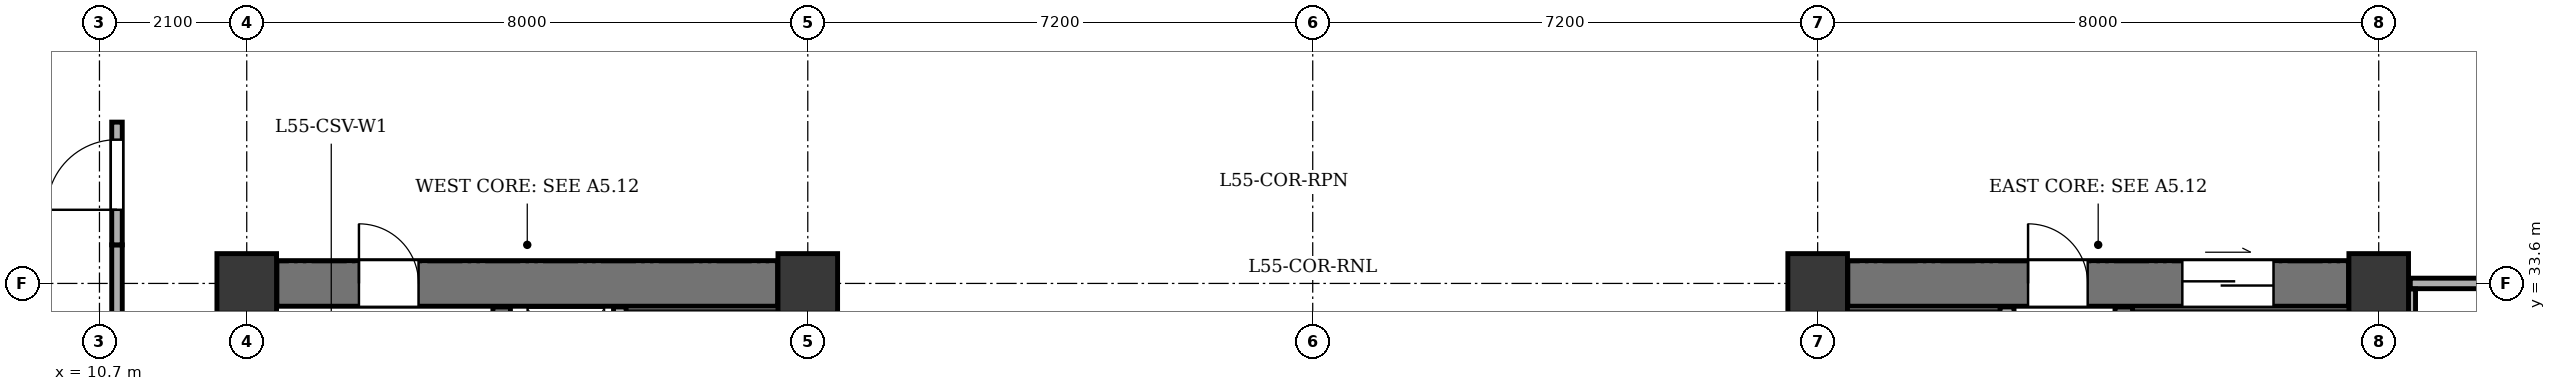
"""IFC4 building model, lengths in metres.
Left out: names, types, materials, properties, quantities, classifications, styles, units other than length and angle.
Written with IfcOpenShell. Run it as: python <this file> out.ifc"""

import sys

from ifc_helpers import new_model, si_unit, direction, frame, frame_2d, origin, origin_2d, place, context, subcontext, project, spatial, rectangle, extrude, element, fill, save


model = new_model("IFC4")
c1 = context("Model", 3, precision=1e-05, world=origin(), true_north=direction((0.0, 1.0)))
c2 = subcontext(c1, "Body", "Model", "MODEL_VIEW")
j1 = project(units=[si_unit("LENGTHUNIT", "METRE"), si_unit("PLANEANGLEUNIT", "RADIAN")], contexts=[c1])
p1 = place(None, origin())
s1 = spatial("IfcSite", under=j1, at=p1, CompositionType="ELEMENT")
p2 = place(p1, origin())
s2 = spatial("IfcBuilding", under=s1, at=p2, CompositionType="ELEMENT")
p3 = place(p2, frame((0.0, 0.0, 214.3)))
s3 = spatial("IfcBuildingStorey", under=s2, at=p3, CompositionType="ELEMENT", Elevation=214.3)
for number, where, z_axis, x_axis in (
    (1, (12.8, 33.6, 0.0), (0.0, 0.0, 1.0), (1.0, 0.0, 0.0)),
    (2, (20.8, 33.6, 0.0), (0.0, 0.0, 1.0), (1.0, 0.0, 0.0)),
    (3, (35.2, 33.6, 0.0), (0.0, 0.0, 1.0), (1.0, 0.0, 0.0)),
    (4, (43.2, 33.6, 0.0), (0.0, 0.0, 1.0), (1.0, 0.0, 0.0)),
):
    element("IfcColumn", number, at=place(p3, frame(where, z_axis=z_axis, x_axis=x_axis)), inside=s3, PredefinedType="COLUMN", context=c2, shape_type="SweptSolid", body=[
        extrude(rectangle(XDim=0.85, YDim=0.85, at=origin_2d()), origin(), (0.0, 0.0, 1.0), 3.4),
    ])
p4 = place(p3, frame((13.23, 33.6, 0.0), z_axis=(0.0, 0.0, 1.0), x_axis=(1.0, 0.0, 0.0)))
e5 = element("IfcWall", 5, at=p4, inside=s3, PredefinedType="SHEAR", context=c2, shape_type="SweptSolid", body=[
    extrude(rectangle(XDim=7.14, YDim=0.65, at=frame_2d((3.57, 0.0))), origin(), (0.0, 0.0, 1.0), 3.1),
])
p5 = place(p4, frame((1.17, 0.0, 0.0)))
e6 = element("IfcOpeningElement", 6, at=p5, cuts=e5, PredefinedType="OPENING", context=c2, shape_type="SweptSolid", body=[
    extrude(rectangle(XDim=0.85, YDim=2.02, at=frame_2d((0.425, 1.01))), frame((0.0, 0.335, 0.0), z_axis=(0.0, -1.0, 0.0), x_axis=(1.0, 0.0, 0.0)), (0.0, 0.0, 1.0), 0.67),
])
p6 = place(p3, frame((16.435, 21.135, 0.0), z_axis=(0.0, 0.0, 1.0), x_axis=(0.0, 1.0, 0.0)))
e7 = element("IfcWall", 7, at=p6, inside=s3, PredefinedType="SHEAR", context=c2, shape_type="SweptSolid", body=[
    extrude(rectangle(XDim=12.13, YDim=0.25, at=frame_2d((6.065, 0.0))), origin(), (0.0, 0.0, 1.0), 3.1),
])
p7 = place(p6, frame((0.515, 0.0, 0.0)))
e8 = element("IfcOpeningElement", 8, at=p7, cuts=e7, PredefinedType="OPENING", context=c2, shape_type="SweptSolid", body=[
    extrude(rectangle(XDim=1.2, YDim=2.15, at=frame_2d((0.6, 1.075))), frame((0.0, 0.135, 0.0), z_axis=(0.0, -1.0, 0.0), x_axis=(1.0, 0.0, 0.0)), (0.0, 0.0, 1.0), 0.27),
])
p8 = place(p6, frame((2.665, 0.0, 0.0)))
e9 = element("IfcOpeningElement", 9, at=p8, cuts=e7, PredefinedType="OPENING", context=c2, shape_type="SweptSolid", body=[
    extrude(rectangle(XDim=1.15, YDim=2.15, at=frame_2d((0.575, 1.075))), frame((0.0, 0.135, 0.0), z_axis=(0.0, -1.0, 0.0), x_axis=(1.0, 0.0, 0.0)), (0.0, 0.0, 1.0), 0.27),
])
p9 = place(p3, frame((18.12, 31.17, 0.0), z_axis=(0.0, 0.0, 1.0), x_axis=(0.0, 1.0, 0.0)))
e10 = element("IfcWall", 10, at=p9, inside=s3, PredefinedType="PARTITIONING", context=c2, shape_type="SweptSolid", body=[
    extrude(rectangle(XDim=2.095, YDim=0.18, at=frame_2d((1.047, 0.0))), origin(), (0.0, 0.0, 1.0), 3.1),
])
p10 = place(p3, frame((35.63, 33.6, 0.0), z_axis=(0.0, 0.0, 1.0), x_axis=(1.0, 0.0, 0.0)))
e11 = element("IfcWall", 11, at=p10, inside=s3, PredefinedType="SHEAR", context=c2, shape_type="SweptSolid", body=[
    extrude(rectangle(XDim=7.14, YDim=0.65, at=frame_2d((3.57, 0.0))), origin(), (0.0, 0.0, 1.0), 3.1),
])
p11 = place(p10, frame((4.77, 0.0, 0.0)))
e12 = element("IfcOpeningElement", 12, at=p11, cuts=e11, PredefinedType="OPENING", context=c2, shape_type="SweptSolid", body=[
    extrude(rectangle(XDim=1.3, YDim=2.15, at=frame_2d((0.65, 1.075))), frame((0.0, 0.335, 0.0), z_axis=(0.0, -1.0, 0.0), x_axis=(1.0, 0.0, 0.0)), (0.0, 0.0, 1.0), 0.67),
])
p12 = place(p10, frame((2.57, 0.0, 0.0)))
e13 = element("IfcOpeningElement", 13, at=p12, cuts=e11, PredefinedType="OPENING", context=c2, shape_type="SweptSolid", body=[
    extrude(rectangle(XDim=0.85, YDim=2.02, at=frame_2d((0.425, 1.01))), frame((0.0, 0.335, 0.0), z_axis=(0.0, -1.0, 0.0), x_axis=(1.0, 0.0, 0.0)), (0.0, 0.0, 1.0), 0.67),
])
p13 = place(p3, frame((39.565, 21.135, 0.0), z_axis=(0.0, 0.0, 1.0), x_axis=(0.0, 1.0, 0.0)))
e14 = element("IfcWall", 14, at=p13, inside=s3, PredefinedType="SHEAR", context=c2, shape_type="SweptSolid", body=[
    extrude(rectangle(XDim=12.13, YDim=0.25, at=frame_2d((6.065, 0.0))), origin(), (0.0, 0.0, 1.0), 3.1),
])
p14 = place(p13, frame((0.515, 0.0, 0.0)))
e15 = element("IfcOpeningElement", 15, at=p14, cuts=e14, PredefinedType="OPENING", context=c2, shape_type="SweptSolid", body=[
    extrude(rectangle(XDim=1.2, YDim=2.15, at=frame_2d((0.6, 1.075))), frame((0.0, 0.135, 0.0), z_axis=(0.0, -1.0, 0.0), x_axis=(1.0, 0.0, 0.0)), (0.0, 0.0, 1.0), 0.27),
])
p15 = place(p13, frame((2.665, 0.0, 0.0)))
e16 = element("IfcOpeningElement", 16, at=p15, cuts=e14, PredefinedType="OPENING", context=c2, shape_type="SweptSolid", body=[
    extrude(rectangle(XDim=1.15, YDim=2.15, at=frame_2d((0.575, 1.075))), frame((0.0, 0.135, 0.0), z_axis=(0.0, -1.0, 0.0), x_axis=(1.0, 0.0, 0.0)), (0.0, 0.0, 1.0), 0.27),
])
p16 = place(p3, frame((37.9, 25.27, 0.0), z_axis=(0.0, 0.0, 1.0), x_axis=(0.0, 1.0, 0.0)))
e17 = element("IfcWall", 17, at=p16, inside=s3, PredefinedType="SOLIDWALL", context=c2, shape_type="SweptSolid", body=[
    extrude(rectangle(XDim=7.995, YDim=0.2, at=frame_2d((3.998, 0.0))), origin(), (0.0, 0.0, 1.0), 3.1),
])
p17 = place(p3, frame((10.95, 20.25, 0.0), z_axis=(0.0, 0.0, 1.0), x_axis=(0.0, 1.0, 0.0)))
e18 = element("IfcWall", 18, at=p17, inside=s3, PredefinedType="PARTITIONING", context=c2, shape_type="SweptSolid", body=[
    extrude(rectangle(XDim=13.9, YDim=0.15, at=frame_2d((6.95, 0.0))), origin(), (0.0, 0.0, 1.0), 3.1),
])
p18 = place(p3, frame((10.95, 34.15, 0.0), z_axis=(0.0, 0.0, 1.0), x_axis=(0.0, 1.0, 0.0)))
e19 = element("IfcWall", 19, at=p18, inside=s3, PredefinedType="PARTITIONING", context=c2, shape_type="SweptSolid", body=[
    extrude(rectangle(XDim=1.75, YDim=0.15, at=frame_2d((0.875, 0.0))), origin(), (0.0, 0.0, 1.0), 3.1),
])
p19 = place(p18, frame((0.5, 0.0, 0.0)))
e20 = element("IfcOpeningElement", 20, at=p19, cuts=e19, PredefinedType="OPENING", context=c2, shape_type="SweptSolid", body=[
    extrude(rectangle(XDim=1.0, YDim=2.1, at=frame_2d((0.5, 1.05))), frame((0.0, 0.085, 0.0), z_axis=(0.0, -1.0, 0.0), x_axis=(1.0, 0.0, 0.0)), (0.0, 0.0, 1.0), 0.17),
])
p20 = place(p3, frame((43.65, 33.6, 0.0), z_axis=(0.0, 0.0, 1.0), x_axis=(1.0, 0.0, 0.0)))
e21 = element("IfcWall", 21, at=p20, inside=s3, PredefinedType="PARTITIONING", context=c2, shape_type="SweptSolid", body=[
    extrude(rectangle(XDim=5.305, YDim=0.15, at=frame_2d((2.653, 0.0))), origin(), (0.0, 0.0, 1.0), 2.535),
])
p21 = place(p3, frame((43.65, 20.25, 0.0), z_axis=(0.0, 0.0, 1.0), x_axis=(0.0, 1.0, 0.0)))
e22 = element("IfcWall", 22, at=p21, inside=s3, PredefinedType="PARTITIONING", context=c2, shape_type="SweptSolid", body=[
    extrude(rectangle(XDim=13.27, YDim=0.15, at=frame_2d((6.635, 0.0))), origin(), (0.0, 0.0, 1.0), 3.1),
])
p22 = place(p5, origin())
e23 = element("IfcDoor", 23, at=p22, inside=s3, OperationType="SINGLE_SWING_LEFT", PredefinedType="DOOR", context=c2, shape_type="SweptSolid", body=[
    extrude(rectangle(XDim=0.85, YDim=2.02, at=frame_2d((0.425, 1.01))), frame((0.0, 0.025, 0.0), z_axis=(0.0, -1.0, 0.0), x_axis=(1.0, 0.0, 0.0)), (0.0, 0.0, 1.0), 0.05),
])
fill(e6, e23)
p23 = place(p11, origin())
e24 = element("IfcDoor", 24, at=p23, inside=s3, OperationType="DOUBLE_DOOR_SLIDING", PredefinedType="DOOR", context=c2, shape_type="SweptSolid", body=[
    extrude(rectangle(XDim=1.3, YDim=2.15, at=frame_2d((0.65, 1.075))), frame((0.0, 0.025, 0.0), z_axis=(0.0, -1.0, 0.0), x_axis=(1.0, 0.0, 0.0)), (0.0, 0.0, 1.0), 0.05),
])
fill(e12, e24)
p24 = place(p12, origin())
e25 = element("IfcDoor", 25, at=p24, inside=s3, OperationType="SINGLE_SWING_LEFT", PredefinedType="DOOR", context=c2, shape_type="SweptSolid", body=[
    extrude(rectangle(XDim=0.85, YDim=2.02, at=frame_2d((0.425, 1.01))), frame((0.0, 0.025, 0.0), z_axis=(0.0, -1.0, 0.0), x_axis=(1.0, 0.0, 0.0)), (0.0, 0.0, 1.0), 0.05),
])
fill(e13, e25)
p25 = place(p19, origin())
e26 = element("IfcDoor", 26, at=p25, inside=s3, OperationType="SINGLE_SWING_LEFT", PredefinedType="DOOR", context=c2, shape_type="SweptSolid", body=[
    extrude(rectangle(XDim=1.0, YDim=2.1, at=frame_2d((0.5, 1.05))), frame((0.0, 0.025, 0.0), z_axis=(0.0, -1.0, 0.0), x_axis=(1.0, 0.0, 0.0)), (0.0, 0.0, 1.0), 0.05),
])
fill(e20, e26)
save(model, sys.argv[1])
